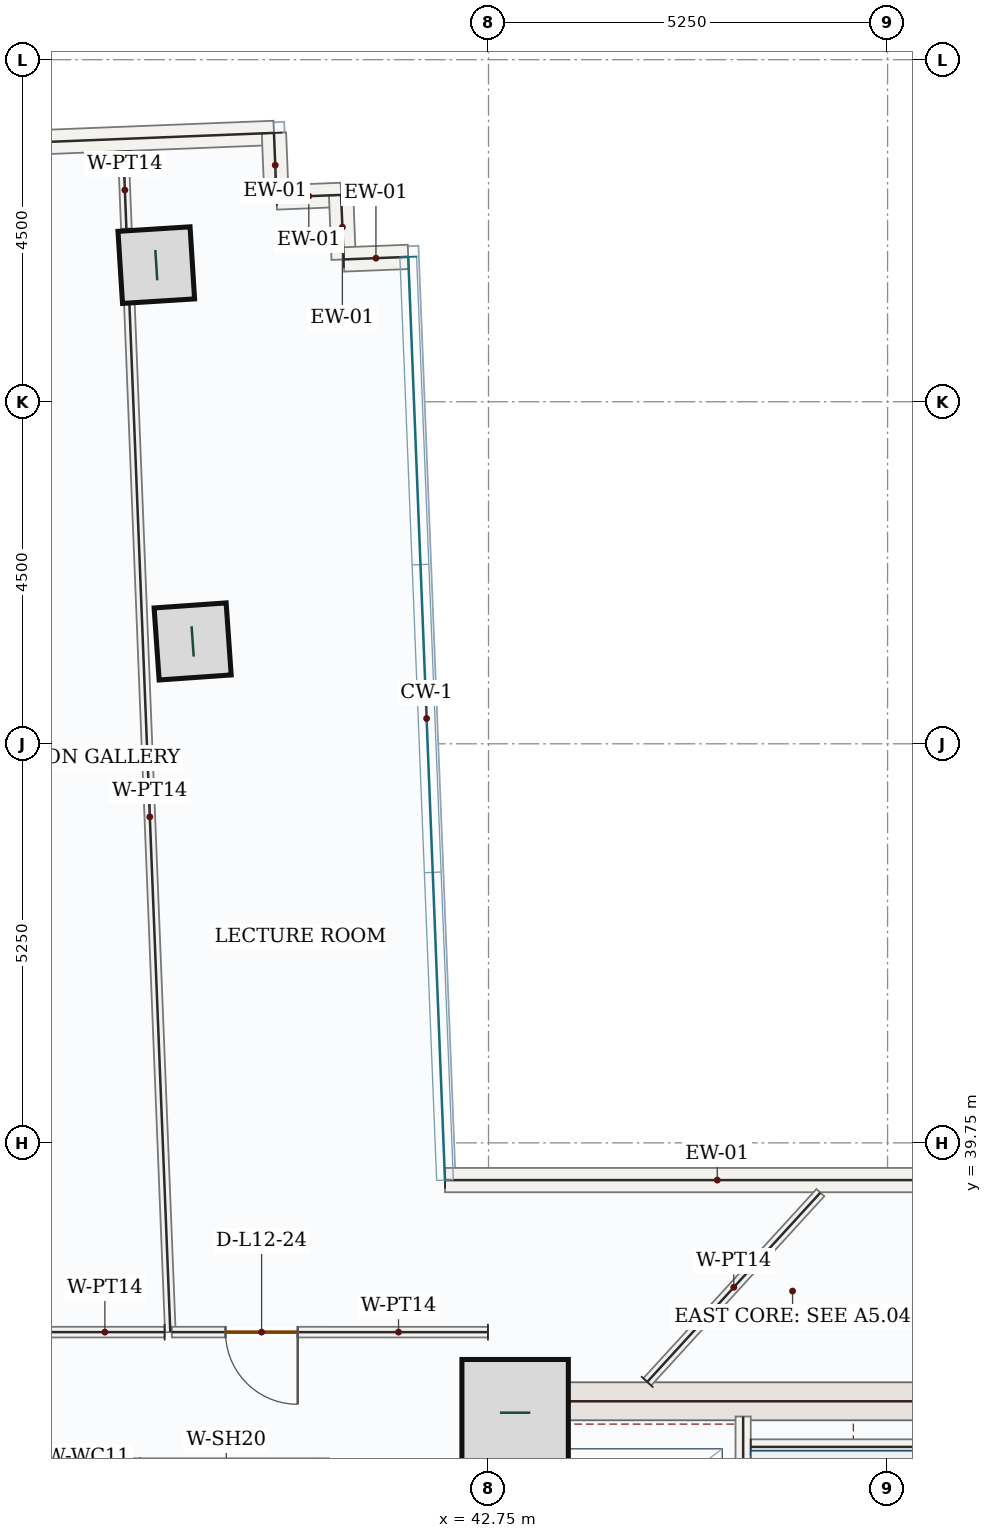
"""IFC4 building model, lengths in metres.
Left out: names, types, materials, properties, quantities, classifications, styles, units other than length and angle.
Written with IfcOpenShell. Run it as: python <this file> out.ifc"""

import sys

from ifc_helpers import new_model, si_unit, direction, frame, frame_2d, origin, origin_2d, place, context, subcontext, project, spatial, rectangle, hollow_rectangle, extrude, source, transform, mapped, element, fill, save


model = new_model("IFC4")
c1 = context("Model", 3, precision=1e-05, world=origin(), true_north=direction((0.0, 1.0)))
c2 = subcontext(c1, "Body", "Model", "MODEL_VIEW")
j1 = project(units=[si_unit("LENGTHUNIT", "METRE"), si_unit("PLANEANGLEUNIT", "RADIAN")], contexts=[c1])
p1 = place(None, origin())
s1 = spatial("IfcSite", under=j1, at=p1, CompositionType="ELEMENT")
p2 = place(p1, origin())
s2 = spatial("IfcBuilding", under=s1, at=p2, CompositionType="ELEMENT")
p3 = place(p2, frame((0.0, 0.0, 58.5)))
s3 = spatial("IfcBuildingStorey", under=s2, at=p3, CompositionType="ELEMENT", Elevation=58.5)
p4 = place(p3, frame((43.0, 28.05, 0.0), z_axis=(0.0, 0.0, 1.0), x_axis=(0.0, 1.0, 0.0)))
e1 = element("IfcWall", 1, at=p4, inside=s3, PredefinedType="SHEAR", context=c2, shape_type="SweptSolid", body=[
    extrude(rectangle(XDim=8.55, YDim=0.5, at=frame_2d((4.275, 0.0))), origin(), (0.0, 0.0, 1.0), 3.95),
])
p5 = place(p4, frame((1.5, 0.0, 0.0)))
e2 = element("IfcOpeningElement", 2, at=p5, cuts=e1, PredefinedType="OPENING", context=c2, shape_type="SweptSolid", body=[
    extrude(rectangle(XDim=1.1, YDim=2.2, at=frame_2d((0.55, 1.1))), frame((0.0, 0.26, 0.0), z_axis=(0.0, -1.0, 0.0), x_axis=(1.0, 0.0, 0.0)), (0.0, 0.0, 1.0), 0.52),
])
m1 = source(origin(), c2, "Body", "SweptSolid", [
    extrude(rectangle(XDim=7.0, YDim=0.5, at=frame_2d((3.5, 0.0))), origin(), (0.0, 0.0, 1.0), 3.95),
])
p6 = place(p3, frame((43.25, 36.35, 0.0), z_axis=(0.0, 0.0, 1.0), x_axis=(1.0, 0.0, 0.0)))
e3 = element("IfcWall", 3, at=p6, inside=s3, PredefinedType="SHEAR", context=c2, shape_type="MappedRepresentation", body=[
    mapped(m1, transform((0.0, 0.0, 0.0), x_axis=(1.0, 0.0, 0.0), y_axis=(0.0, 1.0, 0.0), z_axis=(0.0, 0.0, 1.0), scale=1.0)),
])
m2 = source(origin(), c2, "Body", "SweptSolid", [
    extrude(rectangle(XDim=1.4, YDim=1.4, at=origin_2d()), origin(), (0.0, 0.0, 1.0), 4.2),
])
p7 = place(p3, frame((43.1, 36.2, 0.0), z_axis=(0.0, 0.0, 1.0), x_axis=(1.0, 0.0, 0.0)))
e4 = element("IfcColumn", 4, at=p7, inside=s3, PredefinedType="COLUMN", context=c2, shape_type="MappedRepresentation", body=[
    mapped(m2, transform((0.0, 0.0, 0.0), x_axis=(1.0, 0.0, 0.0), y_axis=(0.0, 1.0, 0.0), z_axis=(0.0, 0.0, 1.0), scale=1.0)),
])
m3 = source(origin(), c2, "Body", "SweptSolid", [
    extrude(hollow_rectangle(XDim=0.95, YDim=0.95, WallThickness=0.05, at=origin_2d()), origin(), (0.0, 0.0, 1.0), 4.2),
])
for number, where, z_axis, x_axis in (
    (5, (38.857, 46.346, 0.0), (0.0, 0.0, 1.0), (-0.07, 0.998, 0.0)),
    (6, (38.379, 51.297, 0.0), (0.0, 0.0, 1.0), (-0.063, 0.998, 0.0)),
):
    element("IfcColumn", number, at=place(p3, frame(where, z_axis=z_axis, x_axis=x_axis)), inside=s3, PredefinedType="COLUMN", context=c2, shape_type="MappedRepresentation", body=[
        mapped(m3, transform((0.0, 0.0, 0.0), x_axis=(1.0, 0.0, 0.0), y_axis=(0.0, 1.0, 0.0), z_axis=(0.0, 0.0, 1.0), scale=1.0)),
    ])
m4 = source(origin(), c2, "Body", "SweptSolid", [
    extrude(rectangle(XDim=9.92, YDim=0.32, at=frame_2d((4.96, 0.0))), origin(), (0.0, 0.0, 1.0), 3.95),
])
p8 = place(p3, frame((30.015, 52.642, 0.0), z_axis=(0.0, 0.0, 1.0), x_axis=(0.999207823998, 0.039796035749, 0.0)))
e7 = element("IfcWall", 7, at=p8, inside=s3, PredefinedType="SOLIDWALL", context=c2, shape_type="MappedRepresentation", body=[
    mapped(m4, transform((0.0, 0.0, 0.0), x_axis=(1.0, 0.0, 0.0), y_axis=(0.0, 1.0, 0.0), z_axis=(0.0, 0.0, 1.0), scale=1.0)),
])
m5 = source(origin(), c2, "Body", "SweptSolid", [
    extrude(rectangle(XDim=0.85, YDim=0.32, at=frame_2d((0.425, 0.0))), origin(), (0.0, 0.0, 1.0), 3.95),
])
p9 = place(p3, frame((39.927, 53.037, 0.0), z_axis=(0.0, 0.0, 1.0), x_axis=(0.039922158152, -0.999202792875, 0.0)))
e8 = element("IfcWall", 8, at=p9, inside=s3, PredefinedType="SOLIDWALL", context=c2, shape_type="MappedRepresentation", body=[
    mapped(m5, transform((0.0, 0.0, 0.0), x_axis=(1.0, 0.0, 0.0), y_axis=(0.0, 1.0, 0.0), z_axis=(0.0, 0.0, 1.0), scale=1.0)),
])
m6 = source(origin(), c2, "Body", "SweptSolid", [
    extrude(rectangle(XDim=0.85, YDim=0.32, at=frame_2d((0.425, 0.0))), origin(), (0.0, 0.0, 1.0), 3.95),
])
for number, where, z_axis, x_axis in (
    (9, (39.961, 52.188, 0.0), (0.0, 0.0, 1.0), (0.999, 0.04, 0.0)),
    (10, (40.81, 52.221, 0.0), (0.0, 0.0, 1.0), (0.04, -0.999, 0.0)),
):
    element("IfcWall", number, at=place(p3, frame(where, z_axis=z_axis, x_axis=x_axis)), inside=s3, PredefinedType="SOLIDWALL", context=c2, shape_type="MappedRepresentation", body=[
        mapped(m6, transform((0.0, 0.0, 0.0), x_axis=(1.0, 0.0, 0.0), y_axis=(0.0, 1.0, 0.0), z_axis=(0.0, 0.0, 1.0), scale=1.0)),
    ])
p10 = place(p3, frame((40.844, 51.372, 0.0), z_axis=(0.0, 0.0, 1.0), x_axis=(0.999214208752, 0.039635401209, 0.0)))
e11 = element("IfcWall", 11, at=p10, inside=s3, PredefinedType="SOLIDWALL", context=c2, shape_type="MappedRepresentation", body=[
    mapped(m5, transform((0.0, 0.0, 0.0), x_axis=(1.0, 0.0, 0.0), y_axis=(0.0, 1.0, 0.0), z_axis=(0.0, 0.0, 1.0), scale=1.0)),
])
m7 = source(origin(), c2, "Body", "SweptSolid", [
    extrude(rectangle(XDim=7.165, YDim=0.32, at=frame_2d((3.583, 0.0))), origin(), (0.0, 0.0, 1.0), 3.95),
])
p11 = place(p3, frame((42.177, 39.26, 0.0), z_axis=(0.0, 0.0, 1.0), x_axis=(1.0, 0.0, 0.0)))
e12 = element("IfcWall", 12, at=p11, inside=s3, PredefinedType="SOLIDWALL", context=c2, shape_type="MappedRepresentation", body=[
    mapped(m7, transform((0.0, 0.0, 0.0), x_axis=(1.0, 0.0, 0.0), y_axis=(0.0, 1.0, 0.0), z_axis=(0.0, 0.0, 1.0), scale=1.0)),
])
p12 = place(p3, frame((46.1, 28.15, 0.0), z_axis=(0.0, 0.0, 1.0), x_axis=(0.0, 1.0, 0.0)))
e13 = element("IfcWall", 13, at=p12, inside=s3, PredefinedType="SOLIDWALL", context=c2, shape_type="SweptSolid", body=[
    extrude(rectangle(XDim=8.0, YDim=0.2, at=frame_2d((4.0, 0.0))), origin(), (0.0, 0.0, 1.0), 3.95),
])
p13 = place(p12, frame((0.4, 0.0, 0.0)))
e14 = element("IfcOpeningElement", 14, at=p13, cuts=e13, PredefinedType="OPENING", context=c2, shape_type="SweptSolid", body=[
    extrude(rectangle(XDim=1.05, YDim=2.15, at=frame_2d((0.525, 1.075))), frame((0.0, 0.11, 0.0), z_axis=(0.0, -1.0, 0.0), x_axis=(1.0, 0.0, 0.0)), (0.0, 0.0, 1.0), 0.22),
])
m8 = source(origin(), c2, "Body", "SweptSolid", [
    extrude(rectangle(XDim=3.25, YDim=0.2, at=frame_2d((1.625, 0.0))), origin(), (0.0, 0.0, 1.0), 3.95),
])
p14 = place(p3, frame((46.2, 35.75, 0.0), z_axis=(0.0, 0.0, 1.0), x_axis=(1.0, 0.0, 0.0)))
e15 = element("IfcWall", 15, at=p14, inside=s3, PredefinedType="SOLIDWALL", context=c2, shape_type="MappedRepresentation", body=[
    mapped(m8, transform((0.0, 0.0, 0.0), x_axis=(1.0, 0.0, 0.0), y_axis=(0.0, 1.0, 0.0), z_axis=(0.0, 0.0, 1.0), scale=1.0)),
])
m9 = source(origin(), c2, "Body", "SweptSolid", [
    extrude(rectangle(XDim=2.4, YDim=0.2, at=frame_2d((1.2, 0.0))), origin(), (0.0, 0.0, 1.0), 3.95),
])
for number, where, z_axis, x_axis in (
    (16, (38.05, 33.2, 0.0), (0.0, 0.0, 1.0), (0.0, 1.0, 0.0)),
    (17, (40.55, 33.2, 0.0), (0.0, 0.0, 1.0), (0.0, 1.0, 0.0)),
):
    element("IfcWall", number, at=place(p3, frame(where, z_axis=z_axis, x_axis=x_axis)), inside=s3, PredefinedType="SOLIDWALL", context=c2, shape_type="MappedRepresentation", body=[
        mapped(m9, transform((0.0, 0.0, 0.0), x_axis=(1.0, 0.0, 0.0), y_axis=(0.0, 1.0, 0.0), z_axis=(0.0, 0.0, 1.0), scale=1.0)),
    ])
m10 = source(origin(), c2, "Body", "SweptSolid", [
    extrude(rectangle(XDim=1.016, YDim=0.14, at=frame_2d((0.508, 0.0))), origin(), (0.0, 0.0, 1.0), 3.95),
])
p15 = place(p3, frame((37.945, 52.793, 0.0), z_axis=(0.0, 0.0, 1.0), x_axis=(0.03988168596, -0.99920440908, 0.0)))
e18 = element("IfcWall", 18, at=p15, inside=s3, PredefinedType="PARTITIONING", context=c2, shape_type="MappedRepresentation", body=[
    mapped(m10, transform((0.0, 0.0, 0.0), x_axis=(1.0, 0.0, 0.0), y_axis=(0.0, 1.0, 0.0), z_axis=(0.0, 0.0, 1.0), scale=1.0)),
])
m11 = source(origin(), c2, "Body", "SweptSolid", [
    extrude(rectangle(XDim=13.568, YDim=0.14, at=frame_2d((6.784, 0.0))), origin(), (0.0, 0.0, 1.0), 3.95),
])
p16 = place(p3, frame((38.024, 50.817, 0.0), z_axis=(0.0, 0.0, 1.0), x_axis=(0.039766111253, -0.99920901537, 0.0)))
e19 = element("IfcWall", 19, at=p16, inside=s3, PredefinedType="PARTITIONING", context=c2, shape_type="MappedRepresentation", body=[
    mapped(m11, transform((0.0, 0.0, 0.0), x_axis=(1.0, 0.0, 0.0), y_axis=(0.0, 1.0, 0.0), z_axis=(0.0, 0.0, 1.0), scale=1.0)),
])
p17 = place(p3, frame((38.489, 37.26, 0.0), z_axis=(0.0, 0.0, 1.0), x_axis=(-1.0, 0.0, 0.0)))
e20 = element("IfcWall", 20, at=p17, inside=s3, PredefinedType="PARTITIONING", context=c2, shape_type="SweptSolid", body=[
    extrude(rectangle(XDim=3.157, YDim=0.14, at=frame_2d((1.579, 0.0))), origin(), (0.0, 0.0, 1.0), 3.95),
])
p18 = place(p17, frame((1.722, 0.0, 0.0)))
e21 = element("IfcOpeningElement", 21, at=p18, cuts=e20, PredefinedType="OPENING", context=c2, shape_type="SweptSolid", body=[
    extrude(rectangle(XDim=0.95, YDim=2.15, at=frame_2d((0.475, 1.075))), frame((0.0, 0.08, 0.0), z_axis=(0.0, -1.0, 0.0), x_axis=(1.0, 0.0, 0.0)), (0.0, 0.0, 1.0), 0.16),
])
m12 = source(origin(), c2, "Body", "SweptSolid", [
    extrude(rectangle(XDim=3.375, YDim=0.14, at=frame_2d((1.688, 0.0))), origin(), (0.0, 0.0, 1.0), 3.95),
])
p19 = place(p3, frame((44.838, 36.605, 0.0), z_axis=(0.0, 0.0, 1.0), x_axis=(0.674974079893, 0.737841440604, 0.0)))
e22 = element("IfcWall", 22, at=p19, inside=s3, PredefinedType="PARTITIONING", context=c2, shape_type="MappedRepresentation", body=[
    mapped(m12, transform((0.0, 0.0, 0.0), x_axis=(1.0, 0.0, 0.0), y_axis=(0.0, 1.0, 0.0), z_axis=(0.0, 0.0, 1.0), scale=1.0)),
])
p20 = place(p3, frame((42.742, 37.26, 0.0), z_axis=(0.0, 0.0, 1.0), x_axis=(-0.999999998277, 5.8706117e-05, 0.0)))
e23 = element("IfcWall", 23, at=p20, inside=s3, PredefinedType="PARTITIONING", context=c2, shape_type="SweptSolid", body=[
    extrude(rectangle(XDim=4.159, YDim=0.14, at=frame_2d((2.079, 0.0))), origin(), (0.0, 0.0, 1.0), 3.95),
])
p21 = place(p20, frame((2.503, 0.0, 0.0)))
e24 = element("IfcOpeningElement", 24, at=p21, cuts=e23, PredefinedType="OPENING", context=c2, shape_type="SweptSolid", body=[
    extrude(rectangle(XDim=0.95, YDim=2.15, at=frame_2d((0.475, 1.075))), frame((0.0, 0.08, 0.0), z_axis=(0.0, -1.0, 0.0), x_axis=(1.0, 0.0, 0.0)), (0.0, 0.0, 1.0), 0.16),
])
m13 = source(origin(), c2, "Body", "SweptSolid", [
    extrude(rectangle(XDim=0.95, YDim=2.15, at=frame_2d((0.475, 1.075))), frame((0.0, 0.025, 0.0), z_axis=(0.0, -1.0, 0.0), x_axis=(1.0, 0.0, 0.0)), (0.0, 0.0, 1.0), 0.05),
])
p22 = place(p21, origin())
e25 = element("IfcDoor", 25, at=p22, inside=s3, OperationType="SINGLE_SWING_LEFT", PredefinedType="DOOR", context=c2, shape_type="MappedRepresentation", body=[
    mapped(m13, transform((0.0, 0.0, 0.0), x_axis=(1.0, 0.0, 0.0), y_axis=(0.0, 1.0, 0.0), z_axis=(0.0, 0.0, 1.0), scale=1.0)),
])
fill(e24, e25)
save(model, sys.argv[1])
